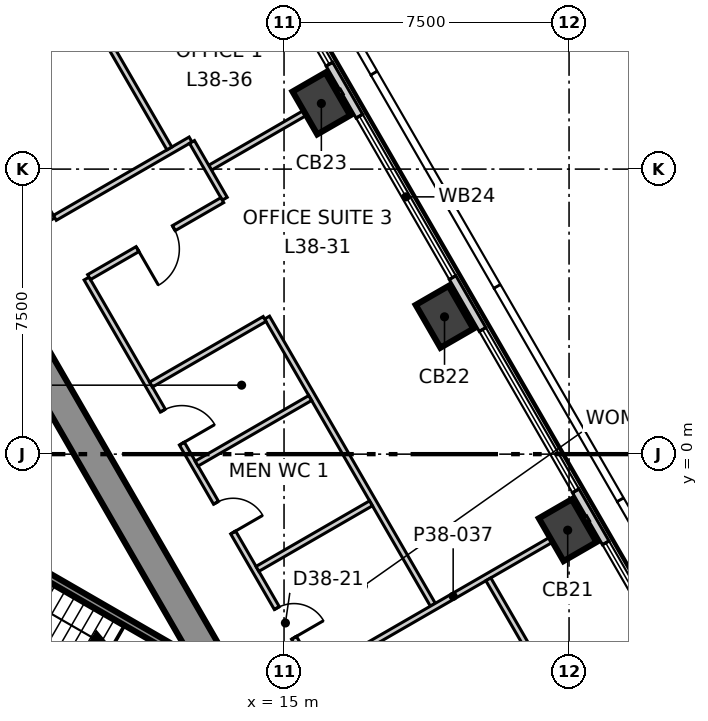
"""IFC4 building model, lengths in metres.
Left out: names, types, materials, properties, quantities, classifications, styles, units other than length and angle.
Written with IfcOpenShell. Run it as: python <this file> out.ifc"""

import sys

from ifc_helpers import new_model, si_unit, direction, frame, frame_2d, origin, origin_2d, place, context, subcontext, project, spatial, polyline, rectangle, outline, extrude, element, fill, save


model = new_model("IFC4")
c1 = context("Model", 3, precision=1e-05, world=origin(), true_north=direction((0.0, 1.0)))
c2 = subcontext(c1, "Body", "Model", "MODEL_VIEW")
j1 = project(units=[si_unit("LENGTHUNIT", "METRE"), si_unit("PLANEANGLEUNIT", "RADIAN")], contexts=[c1])
p1 = place(None, origin())
s1 = spatial("IfcSite", under=j1, at=p1, CompositionType="ELEMENT")
p2 = place(p1, origin())
s2 = spatial("IfcBuilding", under=s1, at=p2, CompositionType="ELEMENT")
p3 = place(p2, frame((0.0, 0.0, 164.3)))
s3 = spatial("IfcBuildingStorey", under=s2, at=p3, CompositionType="ELEMENT", Elevation=164.3)
p4 = place(p3, frame((13.221, -5.7, -0.3), z_axis=(0.0, 0.0, 1.0), x_axis=(-0.499995765644, 0.866027848477, 0.0)))
e1 = element("IfcWall", 1, at=p4, inside=s3, PredefinedType="SHEAR", context=c2, shape_type="SweptSolid", body=[
    extrude(outline(polyline([(-0.231, -0.4), (1.732, -0.4), (3.695, -0.4), (5.658, -0.4), (7.621, -0.4), (9.584, -0.4), (11.547, -0.4), (13.51, -0.4), (15.473, -0.4), (17.436, -0.4), (19.399, -0.4), (21.362, -0.4), (23.325, -0.4), (22.863, 0.4), (20.977, 0.4), (19.091, 0.4), (17.205, 0.4), (15.319, 0.4), (13.433, 0.4), (11.547, 0.4), (9.661, 0.4), (7.775, 0.4), (5.889, 0.4), (4.003, 0.4), (2.117, 0.4), (0.231, 0.4), (-0.231, -0.4)])), origin(), (0.0, 0.0, 1.0), 4.0),
])
p5 = place(p4, frame((10.647, 0.0, 0.3)))
e2 = element("IfcOpeningElement", 2, at=p5, cuts=e1, PredefinedType="OPENING", context=c2, shape_type="SweptSolid", body=[
    extrude(rectangle(XDim=1.8, YDim=2.1, at=frame_2d((0.9, 1.05))), frame((0.0, 0.41, 0.0), z_axis=(0.0, -1.0, 0.0), x_axis=(1.0, 0.0, 0.0)), (0.0, 0.0, 1.0), 0.82),
])
p6 = place(p4, frame((17.671, 0.0, 0.3)))
e3 = element("IfcOpeningElement", 3, at=p6, cuts=e1, PredefinedType="OPENING", context=c2, shape_type="SweptSolid", body=[
    extrude(rectangle(XDim=1.0, YDim=2.1, at=frame_2d((0.5, 1.05))), frame((0.0, 0.41, 0.0), z_axis=(0.0, -1.0, 0.0), x_axis=(1.0, 0.0, 0.0)), (0.0, 0.0, 1.0), 0.82),
])
for number, where, z_axis, x_axis in (
    (4, (22.464, -2.001, -0.3), (0.0, 0.0, 1.0), (-0.5, 0.866, 0.0)),
    (5, (19.223, 3.613, -0.3), (0.0, 0.0, 1.0), (-0.5, 0.866, 0.0)),
    (6, (15.982, 9.227, -0.3), (0.0, 0.0, 1.0), (-0.5, 0.866, 0.0)),
):
    element("IfcColumn", number, at=place(p3, frame(where, z_axis=z_axis, x_axis=x_axis)), inside=s3, PredefinedType="COLUMN", context=c2, shape_type="SweptSolid", body=[
        extrude(rectangle(XDim=1.3, YDim=1.0, at=origin_2d()), origin(), (0.0, 0.0, 1.0), 4.0),
    ])
p7 = place(p3, frame((30.204, -14.006, 0.0), z_axis=(0.0, 0.0, 1.0), x_axis=(-0.500008017777, 0.866020774669, 0.0)))
e7 = element("IfcWall", 7, at=p7, inside=s3, PredefinedType="ELEMENTEDWALL", context=c2, shape_type="SweptSolid", body=[
    extrude(rectangle(XDim=54.443, YDim=0.2, at=frame_2d((27.222, 0.0))), origin(), (0.0, 0.0, 1.0), 3.7),
])
p8 = place(p7, frame((2.094, 0.0, 0.9)))
e8 = element("IfcOpeningElement", 8, at=p8, cuts=e7, PredefinedType="OPENING", context=c2, shape_type="SweptSolid", body=[
    extrude(rectangle(XDim=4.9, YDim=2.5, at=frame_2d((2.45, 1.25))), frame((0.0, 0.11, 0.0), z_axis=(0.0, -1.0, 0.0), x_axis=(1.0, 0.0, 0.0)), (0.0, 0.0, 1.0), 0.22),
])
p9 = place(p7, frame((8.576, 0.0, 0.9)))
e9 = element("IfcOpeningElement", 9, at=p9, cuts=e7, PredefinedType="OPENING", context=c2, shape_type="SweptSolid", body=[
    extrude(rectangle(XDim=4.9, YDim=2.5, at=frame_2d((2.45, 1.25))), frame((0.0, 0.11, 0.0), z_axis=(0.0, -1.0, 0.0), x_axis=(1.0, 0.0, 0.0)), (0.0, 0.0, 1.0), 0.22),
])
p10 = place(p7, frame((15.058, 0.0, 0.9)))
e10 = element("IfcOpeningElement", 10, at=p10, cuts=e7, PredefinedType="OPENING", context=c2, shape_type="SweptSolid", body=[
    extrude(rectangle(XDim=4.9, YDim=2.5, at=frame_2d((2.45, 1.25))), frame((0.0, 0.11, 0.0), z_axis=(0.0, -1.0, 0.0), x_axis=(1.0, 0.0, 0.0)), (0.0, 0.0, 1.0), 0.22),
])
p11 = place(p7, frame((21.54, 0.0, 0.9)))
e11 = element("IfcOpeningElement", 11, at=p11, cuts=e7, PredefinedType="OPENING", context=c2, shape_type="SweptSolid", body=[
    extrude(rectangle(XDim=4.9, YDim=2.5, at=frame_2d((2.45, 1.25))), frame((0.0, 0.11, 0.0), z_axis=(0.0, -1.0, 0.0), x_axis=(1.0, 0.0, 0.0)), (0.0, 0.0, 1.0), 0.22),
])
p12 = place(p7, frame((28.023, 0.0, 0.9)))
e12 = element("IfcOpeningElement", 12, at=p12, cuts=e7, PredefinedType="OPENING", context=c2, shape_type="SweptSolid", body=[
    extrude(rectangle(XDim=4.9, YDim=2.5, at=frame_2d((2.45, 1.25))), frame((0.0, 0.11, 0.0), z_axis=(0.0, -1.0, 0.0), x_axis=(1.0, 0.0, 0.0)), (0.0, 0.0, 1.0), 0.22),
])
p13 = place(p7, frame((34.505, 0.0, 0.9)))
e13 = element("IfcOpeningElement", 13, at=p13, cuts=e7, PredefinedType="OPENING", context=c2, shape_type="SweptSolid", body=[
    extrude(rectangle(XDim=4.9, YDim=2.5, at=frame_2d((2.45, 1.25))), frame((0.0, 0.11, 0.0), z_axis=(0.0, -1.0, 0.0), x_axis=(1.0, 0.0, 0.0)), (0.0, 0.0, 1.0), 0.22),
])
p14 = place(p7, frame((40.987, 0.0, 0.9)))
e14 = element("IfcOpeningElement", 14, at=p14, cuts=e7, PredefinedType="OPENING", context=c2, shape_type="SweptSolid", body=[
    extrude(rectangle(XDim=4.9, YDim=2.5, at=frame_2d((2.45, 1.25))), frame((0.0, 0.11, 0.0), z_axis=(0.0, -1.0, 0.0), x_axis=(1.0, 0.0, 0.0)), (0.0, 0.0, 1.0), 0.22),
])
p15 = place(p7, frame((47.469, 0.0, 0.9)))
e15 = element("IfcOpeningElement", 15, at=p15, cuts=e7, PredefinedType="OPENING", context=c2, shape_type="SweptSolid", body=[
    extrude(rectangle(XDim=4.9, YDim=2.5, at=frame_2d((2.45, 1.25))), frame((0.0, 0.11, 0.0), z_axis=(0.0, -1.0, 0.0), x_axis=(1.0, 0.0, 0.0)), (0.0, 0.0, 1.0), 0.22),
])
p16 = place(p3, frame((13.055, 7.537, 0.0), z_axis=(0.0, 0.0, 1.0), x_axis=(0.866026010844, 0.49999894854, 0.0)))
e16 = element("IfcWall", 16, at=p16, inside=s3, PredefinedType="PARTITIONING", context=c2, shape_type="SweptSolid", body=[
    extrude(rectangle(XDim=4.0, YDim=0.15, at=frame_2d((2.0, 0.0))), origin(), (0.0, 0.0, 1.0), 3.2),
])
p17 = place(p3, frame((0.076, 21.468, 0.0), z_axis=(0.0, 0.0, 1.0), x_axis=(0.500024127084, -0.866011473558, 0.0)))
e17 = element("IfcWall", 17, at=p17, inside=s3, PredefinedType="PARTITIONING", context=c2, shape_type="SweptSolid", body=[
    extrude(rectangle(XDim=17.654, YDim=0.15, at=frame_2d((8.827, 0.0))), origin(), (0.0, 0.0, 1.0), 3.7),
])
p18 = place(p17, frame((11.104, 0.0, 0.0)))
e18 = element("IfcOpeningElement", 18, at=p18, cuts=e17, PredefinedType="OPENING", context=c2, shape_type="SweptSolid", body=[
    extrude(rectangle(XDim=1.1, YDim=2.1, at=frame_2d((0.55, 1.05))), frame((0.0, 0.085, 0.0), z_axis=(0.0, -1.0, 0.0), x_axis=(1.0, 0.0, 0.0)), (0.0, 0.0, 1.0), 0.17),
])
p19 = place(p17, frame((2.14, 0.0, 0.0)))
e19 = element("IfcOpeningElement", 19, at=p19, cuts=e17, PredefinedType="OPENING", context=c2, shape_type="SweptSolid", body=[
    extrude(rectangle(XDim=1.1, YDim=2.1, at=frame_2d((0.55, 1.05))), frame((0.0, 0.085, 0.0), z_axis=(0.0, -1.0, 0.0), x_axis=(1.0, 0.0, 0.0)), (0.0, 0.0, 1.0), 0.17),
])
p20 = place(p3, frame((9.804, 4.62, 0.0), z_axis=(0.0, 0.0, 1.0), x_axis=(0.500000173646, -0.86602530353, 0.0)))
e20 = element("IfcWall", 20, at=p20, inside=s3, PredefinedType="PARTITIONING", context=c2, shape_type="SweptSolid", body=[
    extrude(rectangle(XDim=17.654, YDim=0.15, at=frame_2d((8.827, 0.0))), origin(), (0.0, 0.0, 1.0), 3.7),
])
p21 = place(p20, frame((14.354, 0.0, 0.0)))
e21 = element("IfcOpeningElement", 21, at=p21, cuts=e20, PredefinedType="OPENING", context=c2, shape_type="SweptSolid", body=[
    extrude(rectangle(XDim=1.1, YDim=2.1, at=frame_2d((0.55, 1.05))), frame((0.0, 0.085, 0.0), z_axis=(0.0, -1.0, 0.0), x_axis=(1.0, 0.0, 0.0)), (0.0, 0.0, 1.0), 0.17),
])
p22 = place(p20, frame((10.014, 0.0, 0.0)))
e22 = element("IfcOpeningElement", 22, at=p22, cuts=e20, PredefinedType="OPENING", context=c2, shape_type="SweptSolid", body=[
    extrude(rectangle(XDim=0.9, YDim=2.1, at=frame_2d((0.45, 1.05))), frame((0.0, 0.085, 0.0), z_axis=(0.0, -1.0, 0.0), x_axis=(1.0, 0.0, 0.0)), (0.0, 0.0, 1.0), 0.17),
])
p23 = place(p20, frame((6.814, 0.0, 0.0)))
e23 = element("IfcOpeningElement", 23, at=p23, cuts=e20, PredefinedType="OPENING", context=c2, shape_type="SweptSolid", body=[
    extrude(rectangle(XDim=0.9, YDim=2.1, at=frame_2d((0.45, 1.05))), frame((0.0, 0.085, 0.0), z_axis=(0.0, -1.0, 0.0), x_axis=(1.0, 0.0, 0.0)), (0.0, 0.0, 1.0), 0.17),
])
p24 = place(p20, frame((4.014, 0.0, 0.0)))
e24 = element("IfcOpeningElement", 24, at=p24, cuts=e20, PredefinedType="OPENING", context=c2, shape_type="SweptSolid", body=[
    extrude(rectangle(XDim=1.0, YDim=2.1, at=frame_2d((0.5, 1.05))), frame((0.0, 0.085, 0.0), z_axis=(0.0, -1.0, 0.0), x_axis=(1.0, 0.0, 0.0)), (0.0, 0.0, 1.0), 0.17),
])
p25 = place(p3, frame((8.969, 6.217, 0.0), z_axis=(0.0, 0.0, 1.0), x_axis=(0.865997263264, 0.500048737644, 0.0)))
e25 = element("IfcWall", 25, at=p25, inside=s3, PredefinedType="PARTITIONING", context=c2, shape_type="SweptSolid", body=[
    extrude(rectangle(XDim=4.124, YDim=0.15, at=frame_2d((2.062, 0.0))), origin(), (0.0, 0.0, 1.0), 3.7),
])
p26 = place(p3, frame((12.578, 8.214, 0.0), z_axis=(0.0, 0.0, 1.0), x_axis=(0.499746958151, -0.866171448282, 0.0)))
e26 = element("IfcWall", 26, at=p26, inside=s3, PredefinedType="PARTITIONING", context=c2, shape_type="SweptSolid", body=[
    extrude(rectangle(XDim=1.725, YDim=0.15, at=frame_2d((0.863, 0.0))), origin(), (0.0, 0.0, 1.0), 3.7),
])
p27 = place(p3, frame((14.553, 3.593, 0.0), z_axis=(0.0, 0.0, 1.0), x_axis=(0.500054279689, -0.865994063124, 0.0)))
e27 = element("IfcWall", 27, at=p27, inside=s3, PredefinedType="PARTITIONING", context=c2, shape_type="SweptSolid", body=[
    extrude(rectangle(XDim=8.725, YDim=0.15, at=frame_2d((4.363, 0.0))), origin(), (0.0, 0.0, 1.0), 3.7),
])
p28 = place(p3, frame((11.5, 1.831, 0.0), z_axis=(0.0, 0.0, 1.0), x_axis=(0.866061862632, 0.499936846106, 0.0)))
e28 = element("IfcWall", 28, at=p28, inside=s3, PredefinedType="PARTITIONING", context=c2, shape_type="SweptSolid", body=[
    extrude(rectangle(XDim=3.45, YDim=0.15, at=frame_2d((1.725, 0.0))), origin(), (0.0, 0.0, 1.0), 3.7),
])
p29 = place(p3, frame((9.869, 4.658, 0.0), z_axis=(0.0, 0.0, 1.0), x_axis=(0.865929493314, 0.500166085025, 0.0)))
e29 = element("IfcWall", 29, at=p29, inside=s3, PredefinedType="PARTITIONING", context=c2, shape_type="SweptSolid", body=[
    extrude(rectangle(XDim=4.049, YDim=0.15, at=frame_2d((2.024, 0.0))), origin(), (0.0, 0.0, 1.0), 3.7),
])
p30 = place(p29, frame((1.474, 0.0, 0.0)))
e30 = element("IfcOpeningElement", 30, at=p30, cuts=e29, PredefinedType="OPENING", context=c2, shape_type="SweptSolid", body=[
    extrude(rectangle(XDim=1.1, YDim=2.1, at=frame_2d((0.55, 1.05))), frame((0.0, 0.085, 0.0), z_axis=(0.0, -1.0, 0.0), x_axis=(1.0, 0.0, 0.0)), (0.0, 0.0, 1.0), 0.17),
])
for number, where, z_axis, x_axis in (
    (31, (12.7, -0.248, 0.0), (0.0, 0.0, 1.0), (0.866, 0.5, 0.0)),
    (32, (14.3, -3.019, 0.0), (0.0, 0.0, 1.0), (0.866, 0.5, 0.0)),
):
    element("IfcWall", number, at=place(p3, frame(where, z_axis=z_axis, x_axis=x_axis)), inside=s3, PredefinedType="PARTITIONING", context=c2, shape_type="SweptSolid", body=[
        extrude(rectangle(XDim=3.45, YDim=0.15, at=frame_2d((1.725, 0.0))), origin(), (0.0, 0.0, 1.0), 3.7),
    ])
p31 = place(p3, frame((15.9, -5.79, 0.0), z_axis=(0.0, 0.0, 1.0), x_axis=(0.866061630889, 0.499937247563, 0.0)))
e33 = element("IfcWall", 33, at=p31, inside=s3, PredefinedType="PARTITIONING", context=c2, shape_type="SweptSolid", body=[
    extrude(rectangle(XDim=8.199, YDim=0.15, at=frame_2d((4.1, 0.0))), origin(), (0.0, 0.0, 1.0), 3.7),
])
p32 = place(p3, frame((6.026, 18.362, 0.0), z_axis=(0.0, 0.0, 1.0), x_axis=(0.499991479218, -0.866030323204, 0.0)))
e34 = element("IfcWall", 34, at=p32, inside=s3, PredefinedType="PARTITIONING", context=c2, shape_type="SweptSolid", body=[
    extrude(rectangle(XDim=11.914, YDim=0.15, at=frame_2d((5.957, 0.0))), origin(), (0.0, 0.0, 1.0), 3.7),
])
p33 = place(p32, frame((5.439, 0.0, 0.0)))
e35 = element("IfcOpeningElement", 35, at=p33, cuts=e34, PredefinedType="OPENING", context=c2, shape_type="SweptSolid", body=[
    extrude(rectangle(XDim=1.0, YDim=2.1, at=frame_2d((0.5, 1.05))), frame((0.0, 0.085, 0.0), z_axis=(0.0, -1.0, 0.0), x_axis=(1.0, 0.0, 0.0)), (0.0, 0.0, 1.0), 0.17),
])
p34 = place(p3, frame((20.376, -3.293, 0.0), z_axis=(0.0, 0.0, 1.0), x_axis=(0.500050108258, -0.865996471835, 0.0)))
e36 = element("IfcWall", 36, at=p34, inside=s3, PredefinedType="PARTITIONING", context=c2, shape_type="SweptSolid", body=[
    extrude(rectangle(XDim=5.525, YDim=0.15, at=frame_2d((2.763, 0.0))), origin(), (0.0, 0.0, 1.0), 3.7),
])
p35 = place(p3, frame((4.929, -4.693, 0.0), z_axis=(0.0, 0.0, 1.0), x_axis=(0.866005769735, -0.50003400563, 0.0)))
e37 = element("IfcWall", 37, at=p35, inside=s3, PredefinedType="SOLIDWALL", context=c2, shape_type="SweptSolid", body=[
    extrude(rectangle(XDim=7.665, YDim=0.2, at=frame_2d((3.833, 0.0))), origin(), (0.0, 0.0, 1.0), 3.7),
])
p36 = place(p3, frame((6.529, -1.922, 0.0), z_axis=(0.0, 0.0, 1.0), x_axis=(0.866060938598, -0.499938446846, 0.0)))
e38 = element("IfcWall", 38, at=p36, inside=s3, PredefinedType="SOLIDWALL", context=c2, shape_type="SweptSolid", body=[
    extrude(rectangle(XDim=7.665, YDim=0.2, at=frame_2d((3.832, 0.0))), origin(), (0.0, 0.0, 1.0), 3.7),
])
p37 = place(p9, origin())
e39 = element("IfcWindow", 39, at=p37, inside=s3, PartitioningType="SINGLE_PANEL", PredefinedType="WINDOW", context=c2, shape_type="SweptSolid", body=[
    extrude(rectangle(XDim=4.9, YDim=2.5, at=frame_2d((2.45, 1.25))), frame((0.0, 0.03, 0.0), z_axis=(0.0, -1.0, 0.0), x_axis=(1.0, 0.0, 0.0)), (0.0, 0.0, 1.0), 0.06),
])
fill(e9, e39)
p38 = place(p10, origin())
e40 = element("IfcWindow", 40, at=p38, inside=s3, PartitioningType="SINGLE_PANEL", PredefinedType="WINDOW", context=c2, shape_type="SweptSolid", body=[
    extrude(rectangle(XDim=4.9, YDim=2.5, at=frame_2d((2.45, 1.25))), frame((0.0, 0.03, 0.0), z_axis=(0.0, -1.0, 0.0), x_axis=(1.0, 0.0, 0.0)), (0.0, 0.0, 1.0), 0.06),
])
fill(e10, e40)
p39 = place(p11, origin())
e41 = element("IfcWindow", 41, at=p39, inside=s3, PartitioningType="SINGLE_PANEL", PredefinedType="WINDOW", context=c2, shape_type="SweptSolid", body=[
    extrude(rectangle(XDim=4.9, YDim=2.5, at=frame_2d((2.45, 1.25))), frame((0.0, 0.03, 0.0), z_axis=(0.0, -1.0, 0.0), x_axis=(1.0, 0.0, 0.0)), (0.0, 0.0, 1.0), 0.06),
])
fill(e11, e41)
p40 = place(p12, origin())
e42 = element("IfcWindow", 42, at=p40, inside=s3, PartitioningType="SINGLE_PANEL", PredefinedType="WINDOW", context=c2, shape_type="SweptSolid", body=[
    extrude(rectangle(XDim=4.9, YDim=2.5, at=frame_2d((2.45, 1.25))), frame((0.0, 0.03, 0.0), z_axis=(0.0, -1.0, 0.0), x_axis=(1.0, 0.0, 0.0)), (0.0, 0.0, 1.0), 0.06),
])
fill(e12, e42)
p41 = place(p30, origin())
e43 = element("IfcDoor", 43, at=p41, inside=s3, OperationType="SINGLE_SWING_LEFT", PredefinedType="DOOR", context=c2, shape_type="SweptSolid", body=[
    extrude(rectangle(XDim=1.1, YDim=2.1, at=frame_2d((0.55, 1.05))), frame((0.0, 0.025, 0.0), z_axis=(0.0, -1.0, 0.0), x_axis=(1.0, 0.0, 0.0)), (0.0, 0.0, 1.0), 0.05),
])
fill(e30, e43)
p42 = place(p22, origin())
e44 = element("IfcDoor", 44, at=p42, inside=s3, OperationType="SINGLE_SWING_LEFT", PredefinedType="DOOR", context=c2, shape_type="SweptSolid", body=[
    extrude(rectangle(XDim=0.9, YDim=2.1, at=frame_2d((0.45, 1.05))), frame((0.0, 0.025, 0.0), z_axis=(0.0, -1.0, 0.0), x_axis=(1.0, 0.0, 0.0)), (0.0, 0.0, 1.0), 0.05),
])
fill(e22, e44)
p43 = place(p23, origin())
e45 = element("IfcDoor", 45, at=p43, inside=s3, OperationType="SINGLE_SWING_LEFT", PredefinedType="DOOR", context=c2, shape_type="SweptSolid", body=[
    extrude(rectangle(XDim=0.9, YDim=2.1, at=frame_2d((0.45, 1.05))), frame((0.0, 0.025, 0.0), z_axis=(0.0, -1.0, 0.0), x_axis=(1.0, 0.0, 0.0)), (0.0, 0.0, 1.0), 0.05),
])
fill(e23, e45)
p44 = place(p24, origin())
e46 = element("IfcDoor", 46, at=p44, inside=s3, OperationType="SINGLE_SWING_LEFT", PredefinedType="DOOR", context=c2, shape_type="SweptSolid", body=[
    extrude(rectangle(XDim=1.0, YDim=2.1, at=frame_2d((0.5, 1.05))), frame((0.0, 0.025, 0.0), z_axis=(0.0, -1.0, 0.0), x_axis=(1.0, 0.0, 0.0)), (0.0, 0.0, 1.0), 0.05),
])
fill(e24, e46)
save(model, sys.argv[1])
